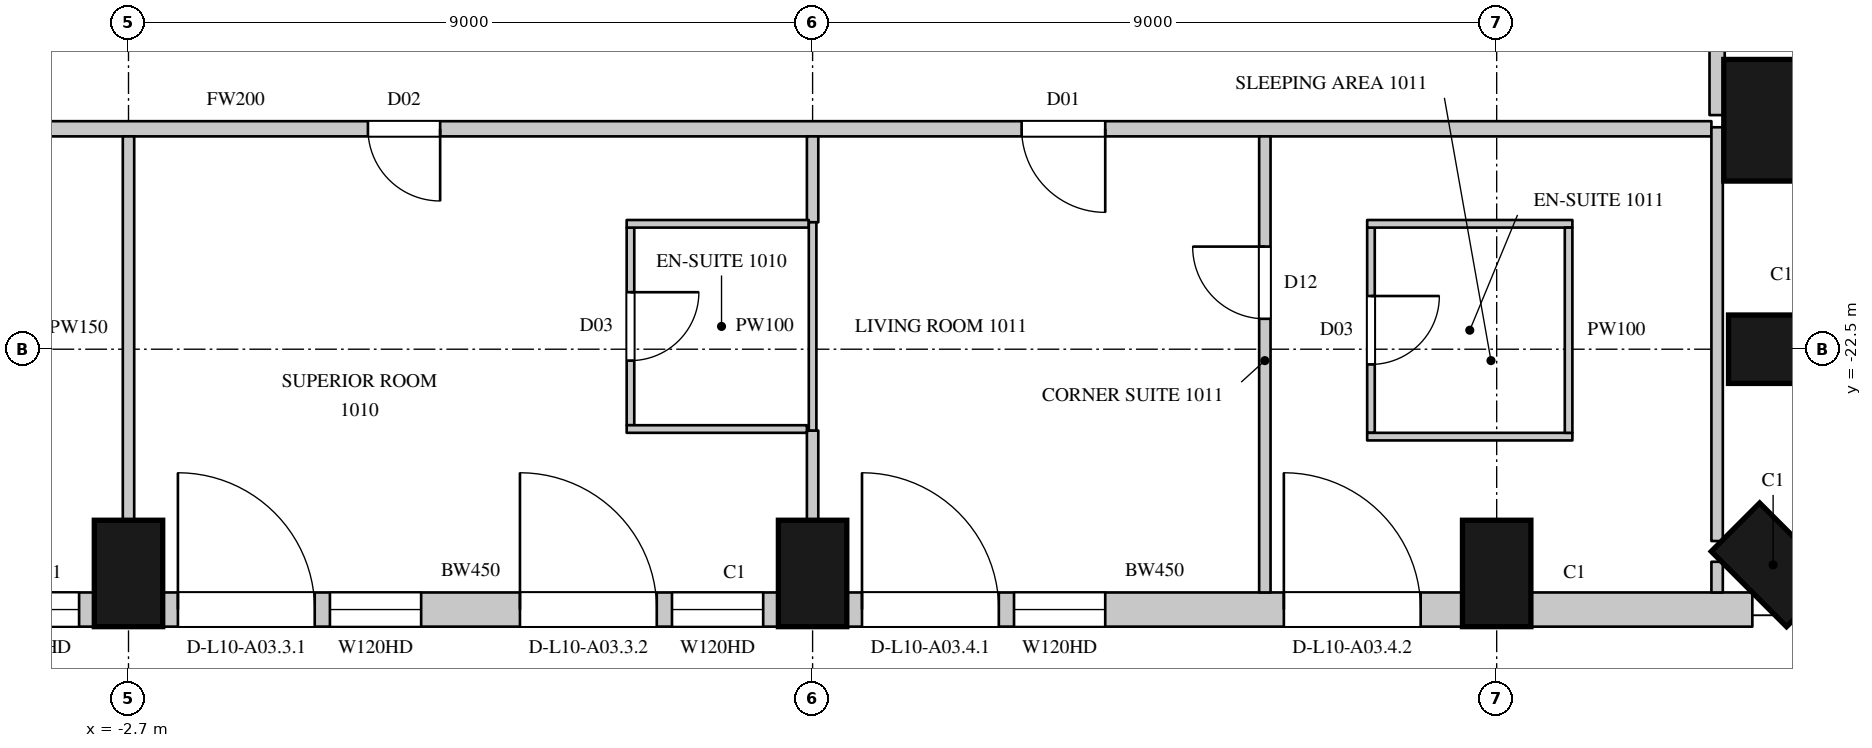
"""IFC4 building model, lengths in metres.
Left out: names, types, materials, properties, quantities, classifications, styles, units other than length and angle.
Written with IfcOpenShell. Run it as: python <this file> out.ifc"""

import sys

from ifc_helpers import new_model, si_unit, direction, frame, frame_2d, origin, origin_2d, place, context, subcontext, project, spatial, rectangle, circle, extrude, element, fill, save


model = new_model("IFC4")
c1 = context("Model", 3, precision=1e-05, world=origin(), true_north=direction((0.0, 1.0)))
c2 = subcontext(c1, "Body", "Model", "MODEL_VIEW")
j1 = project(units=[si_unit("LENGTHUNIT", "METRE"), si_unit("PLANEANGLEUNIT", "RADIAN")], contexts=[c1])
p1 = place(None, origin())
s1 = spatial("IfcSite", under=j1, at=p1, CompositionType="ELEMENT")
p2 = place(p1, origin())
s2 = spatial("IfcBuilding", under=s1, at=p2, CompositionType="ELEMENT")
p3 = place(p2, frame((0.0, 0.0, 66.3)))
s3 = spatial("IfcBuildingStorey", under=s2, at=p3, CompositionType="ELEMENT", Elevation=66.3)
for number, where, z_axis, x_axis in (
    (1, (-2.7, -25.45, 0.0), (0.0, 0.0, 1.0), (1.0, 0.0, 0.0)),
    (2, (6.3, -25.45, 0.0), (0.0, 0.0, 1.0), (1.0, 0.0, 0.0)),
    (3, (15.3, -25.45, 0.0), (0.0, 0.0, 1.0), (1.0, 0.0, 0.0)),
    (4, (18.937, -25.337, 0.0), (0.0, 0.0, 1.0), (0.707, 0.707, 0.0)),
    (5, (19.05, -22.5, 0.0), (0.0, 0.0, 1.0), (0.0, 1.0, 0.0)),
):
    element("IfcColumn", number, at=place(p3, frame(where, z_axis=z_axis, x_axis=x_axis)), inside=s3, PredefinedType="COLUMN", context=c2, shape_type="SweptSolid", body=[
        extrude(rectangle(XDim=0.9, YDim=1.4, at=origin_2d()), origin(), (0.0, 0.0, 1.0), 3.6),
    ])
p4 = place(p3, frame((19.088, -19.488, 0.0), z_axis=(0.0, 0.0, 1.0), x_axis=(1.0, 0.0, 0.0)))
e6 = element("IfcColumn", 6, at=p4, inside=s3, PredefinedType="COLUMN", context=c2, shape_type="SweptSolid", body=[
    extrude(circle(Radius=0.8, at=origin_2d()), origin(), (0.0, 0.0, 1.0), 3.6),
])
p5 = place(p3, frame((-11.25, -25.925, 0.0), z_axis=(0.0, 0.0, 1.0), x_axis=(1.0, 0.0, 0.0)))
e7 = element("IfcWall", 7, at=p5, inside=s3, PredefinedType="SOLIDWALL", context=c2, shape_type="SweptSolid", body=[
    extrude(rectangle(XDim=8.1, YDim=0.45, at=frame_2d((4.05, 0.0))), origin(), (0.0, 0.0, 1.0), 3.3),
])
p6 = place(p5, frame((0.2, 0.0, 0.0)))
e8 = element("IfcOpeningElement", 8, at=p6, cuts=e7, PredefinedType="OPENING", context=c2, shape_type="SweptSolid", body=[
    extrude(rectangle(XDim=1.8, YDim=2.4, at=frame_2d((0.9, 1.2))), frame((0.0, 0.235, 0.0), z_axis=(0.0, -1.0, 0.0), x_axis=(1.0, 0.0, 0.0)), (0.0, 0.0, 1.0), 0.47),
])
p7 = place(p5, frame((2.2, 0.0, 1.05)))
e9 = element("IfcOpeningElement", 9, at=p7, cuts=e7, PredefinedType="OPENING", context=c2, shape_type="SweptSolid", body=[
    extrude(rectangle(XDim=1.2, YDim=2.0, at=frame_2d((0.6, 1.0))), frame((0.0, 0.235, 0.0), z_axis=(0.0, -1.0, 0.0), x_axis=(1.0, 0.0, 0.0)), (0.0, 0.0, 1.0), 0.47),
])
p8 = place(p5, frame((4.7, 0.0, 0.0)))
e10 = element("IfcOpeningElement", 10, at=p8, cuts=e7, PredefinedType="OPENING", context=c2, shape_type="SweptSolid", body=[
    extrude(rectangle(XDim=1.8, YDim=2.4, at=frame_2d((0.9, 1.2))), frame((0.0, 0.235, 0.0), z_axis=(0.0, -1.0, 0.0), x_axis=(1.0, 0.0, 0.0)), (0.0, 0.0, 1.0), 0.47),
])
p9 = place(p5, frame((6.7, 0.0, 1.05)))
e11 = element("IfcOpeningElement", 11, at=p9, cuts=e7, PredefinedType="OPENING", context=c2, shape_type="SweptSolid", body=[
    extrude(rectangle(XDim=1.2, YDim=2.0, at=frame_2d((0.6, 1.0))), frame((0.0, 0.235, 0.0), z_axis=(0.0, -1.0, 0.0), x_axis=(1.0, 0.0, 0.0)), (0.0, 0.0, 1.0), 0.47),
])
p10 = place(p3, frame((-2.25, -25.925, 0.0), z_axis=(0.0, 0.0, 1.0), x_axis=(1.0, 0.0, 0.0)))
e12 = element("IfcWall", 12, at=p10, inside=s3, PredefinedType="SOLIDWALL", context=c2, shape_type="SweptSolid", body=[
    extrude(rectangle(XDim=8.1, YDim=0.45, at=frame_2d((4.05, 0.0))), origin(), (0.0, 0.0, 1.0), 3.3),
])
p11 = place(p10, frame((0.2, 0.0, 0.0)))
e13 = element("IfcOpeningElement", 13, at=p11, cuts=e12, PredefinedType="OPENING", context=c2, shape_type="SweptSolid", body=[
    extrude(rectangle(XDim=1.8, YDim=2.4, at=frame_2d((0.9, 1.2))), frame((0.0, 0.235, 0.0), z_axis=(0.0, -1.0, 0.0), x_axis=(1.0, 0.0, 0.0)), (0.0, 0.0, 1.0), 0.47),
])
p12 = place(p10, frame((2.2, 0.0, 1.05)))
e14 = element("IfcOpeningElement", 14, at=p12, cuts=e12, PredefinedType="OPENING", context=c2, shape_type="SweptSolid", body=[
    extrude(rectangle(XDim=1.2, YDim=2.0, at=frame_2d((0.6, 1.0))), frame((0.0, 0.235, 0.0), z_axis=(0.0, -1.0, 0.0), x_axis=(1.0, 0.0, 0.0)), (0.0, 0.0, 1.0), 0.47),
])
p13 = place(p10, frame((4.7, 0.0, 0.0)))
e15 = element("IfcOpeningElement", 15, at=p13, cuts=e12, PredefinedType="OPENING", context=c2, shape_type="SweptSolid", body=[
    extrude(rectangle(XDim=1.8, YDim=2.4, at=frame_2d((0.9, 1.2))), frame((0.0, 0.235, 0.0), z_axis=(0.0, -1.0, 0.0), x_axis=(1.0, 0.0, 0.0)), (0.0, 0.0, 1.0), 0.47),
])
p14 = place(p10, frame((6.7, 0.0, 1.05)))
e16 = element("IfcOpeningElement", 16, at=p14, cuts=e12, PredefinedType="OPENING", context=c2, shape_type="SweptSolid", body=[
    extrude(rectangle(XDim=1.2, YDim=2.0, at=frame_2d((0.6, 1.0))), frame((0.0, 0.235, 0.0), z_axis=(0.0, -1.0, 0.0), x_axis=(1.0, 0.0, 0.0)), (0.0, 0.0, 1.0), 0.47),
])
p15 = place(p3, frame((6.75, -25.925, 0.0), z_axis=(0.0, 0.0, 1.0), x_axis=(1.0, 0.0, 0.0)))
e17 = element("IfcWall", 17, at=p15, inside=s3, PredefinedType="SOLIDWALL", context=c2, shape_type="SweptSolid", body=[
    extrude(rectangle(XDim=8.1, YDim=0.45, at=frame_2d((4.05, 0.0))), origin(), (0.0, 0.0, 1.0), 3.3),
])
p16 = place(p15, frame((0.2, 0.0, 0.0)))
e18 = element("IfcOpeningElement", 18, at=p16, cuts=e17, PredefinedType="OPENING", context=c2, shape_type="SweptSolid", body=[
    extrude(rectangle(XDim=1.8, YDim=2.4, at=frame_2d((0.9, 1.2))), frame((0.0, 0.235, 0.0), z_axis=(0.0, -1.0, 0.0), x_axis=(1.0, 0.0, 0.0)), (0.0, 0.0, 1.0), 0.47),
])
p17 = place(p15, frame((2.2, 0.0, 1.05)))
e19 = element("IfcOpeningElement", 19, at=p17, cuts=e17, PredefinedType="OPENING", context=c2, shape_type="SweptSolid", body=[
    extrude(rectangle(XDim=1.2, YDim=2.0, at=frame_2d((0.6, 1.0))), frame((0.0, 0.235, 0.0), z_axis=(0.0, -1.0, 0.0), x_axis=(1.0, 0.0, 0.0)), (0.0, 0.0, 1.0), 0.47),
])
p18 = place(p15, frame((5.75, 0.0, 0.0)))
e20 = element("IfcOpeningElement", 20, at=p18, cuts=e17, PredefinedType="OPENING", context=c2, shape_type="SweptSolid", body=[
    extrude(rectangle(XDim=1.8, YDim=2.4, at=frame_2d((0.9, 1.2))), frame((0.0, 0.235, 0.0), z_axis=(0.0, -1.0, 0.0), x_axis=(1.0, 0.0, 0.0)), (0.0, 0.0, 1.0), 0.47),
])
p19 = place(p3, frame((15.75, -25.925, 0.0), z_axis=(0.0, 0.0, 1.0), x_axis=(1.0, 0.0, 0.0)))
e21 = element("IfcWall", 21, at=p19, inside=s3, PredefinedType="SOLIDWALL", context=c2, shape_type="SweptSolid", body=[
    extrude(rectangle(XDim=2.914, YDim=0.45, at=frame_2d((1.457, 0.0))), origin(), (0.0, 0.0, 1.0), 3.3),
])
p20 = place(p3, frame((-20.7, -19.6, 0.0), z_axis=(0.0, 0.0, 1.0), x_axis=(1.0, 0.0, 0.0)))
e22 = element("IfcWall", 22, at=p20, inside=s3, PredefinedType="PARTITIONING", context=c2, shape_type="SweptSolid", body=[
    extrude(rectangle(XDim=38.825, YDim=0.2, at=frame_2d((19.413, 0.0))), origin(), (0.0, 0.0, 1.0), 3.3),
])
p21 = place(p20, frame((3.15, 0.0, 0.0)))
e23 = element("IfcOpeningElement", 23, at=p21, cuts=e22, PredefinedType="OPENING", context=c2, shape_type="SweptSolid", body=[
    extrude(rectangle(XDim=0.95, YDim=2.2, at=frame_2d((0.475, 1.1))), frame((0.0, 0.11, 0.0), z_axis=(0.0, -1.0, 0.0), x_axis=(1.0, 0.0, 0.0)), (0.0, 0.0, 1.0), 0.22),
])
p22 = place(p20, frame((13.9, 0.0, 0.0)))
e24 = element("IfcOpeningElement", 24, at=p22, cuts=e22, PredefinedType="OPENING", context=c2, shape_type="SweptSolid", body=[
    extrude(rectangle(XDim=0.95, YDim=2.2, at=frame_2d((0.475, 1.1))), frame((0.0, 0.11, 0.0), z_axis=(0.0, -1.0, 0.0), x_axis=(1.0, 0.0, 0.0)), (0.0, 0.0, 1.0), 0.22),
])
p23 = place(p20, frame((21.15, 0.0, 0.0)))
e25 = element("IfcOpeningElement", 25, at=p23, cuts=e22, PredefinedType="OPENING", context=c2, shape_type="SweptSolid", body=[
    extrude(rectangle(XDim=0.95, YDim=2.2, at=frame_2d((0.475, 1.1))), frame((0.0, 0.11, 0.0), z_axis=(0.0, -1.0, 0.0), x_axis=(1.0, 0.0, 0.0)), (0.0, 0.0, 1.0), 0.22),
])
p24 = place(p20, frame((29.75, 0.0, 0.0)))
e26 = element("IfcOpeningElement", 26, at=p24, cuts=e22, PredefinedType="OPENING", context=c2, shape_type="SweptSolid", body=[
    extrude(rectangle(XDim=1.1, YDim=2.4, at=frame_2d((0.55, 1.2))), frame((0.0, 0.11, 0.0), z_axis=(0.0, -1.0, 0.0), x_axis=(1.0, 0.0, 0.0)), (0.0, 0.0, 1.0), 0.22),
])
p25 = place(p3, frame((18.2, -19.42, 0.0), z_axis=(0.0, 0.0, 1.0), x_axis=(0.0, 1.0, 0.0)))
e27 = element("IfcWall", 27, at=p25, inside=s3, PredefinedType="PARTITIONING", context=c2, shape_type="SweptSolid", body=[
    extrude(rectangle(XDim=14.67, YDim=0.2, at=frame_2d((7.335, 0.0))), origin(), (0.0, 0.0, 1.0), 3.3),
])
p26 = place(p25, frame((3.95, 0.0, 0.0)))
e28 = element("IfcOpeningElement", 28, at=p26, cuts=e27, PredefinedType="OPENING", context=c2, shape_type="SweptSolid", body=[
    extrude(rectangle(XDim=0.95, YDim=2.2, at=frame_2d((0.475, 1.1))), frame((0.0, 0.11, 0.0), z_axis=(0.0, -1.0, 0.0), x_axis=(1.0, 0.0, 0.0)), (0.0, 0.0, 1.0), 0.22),
])
p27 = place(p25, frame((13.35, 0.0, 0.0)))
e29 = element("IfcOpeningElement", 29, at=p27, cuts=e27, PredefinedType="OPENING", context=c2, shape_type="SweptSolid", body=[
    extrude(rectangle(XDim=0.95, YDim=2.2, at=frame_2d((0.475, 1.1))), frame((0.0, 0.11, 0.0), z_axis=(0.0, -1.0, 0.0), x_axis=(1.0, 0.0, 0.0)), (0.0, 0.0, 1.0), 0.22),
])
p28 = place(p3, frame((-2.7, -24.75, 0.0), z_axis=(0.0, 0.0, 1.0), x_axis=(0.0, 1.0, 0.0)))
e30 = element("IfcWall", 30, at=p28, inside=s3, PredefinedType="PARTITIONING", context=c2, shape_type="SweptSolid", body=[
    extrude(rectangle(XDim=5.05, YDim=0.15, at=frame_2d((2.525, 0.0))), origin(), (0.0, 0.0, 1.0), 2.75),
])
p29 = place(p3, frame((6.3, -24.75, 0.0), z_axis=(0.0, 0.0, 1.0), x_axis=(0.0, 1.0, 0.0)))
e31 = element("IfcWall", 31, at=p29, inside=s3, PredefinedType="PARTITIONING", context=c2, shape_type="SweptSolid", body=[
    extrude(rectangle(XDim=1.18, YDim=0.15, at=frame_2d((0.59, 0.0))), origin(), (0.0, 0.0, 1.0), 2.75),
])
p30 = place(p3, frame((6.3, -20.83, 0.0), z_axis=(0.0, 0.0, 1.0), x_axis=(0.0, 1.0, 0.0)))
e32 = element("IfcWall", 32, at=p30, inside=s3, PredefinedType="PARTITIONING", context=c2, shape_type="SweptSolid", body=[
    extrude(rectangle(XDim=1.13, YDim=0.15, at=frame_2d((0.565, 0.0))), origin(), (0.0, 0.0, 1.0), 2.75),
])
p31 = place(p3, frame((12.25, -25.7, 0.0), z_axis=(0.0, 0.0, 1.0), x_axis=(0.0, 1.0, 0.0)))
e33 = element("IfcWall", 33, at=p31, inside=s3, PredefinedType="PARTITIONING", context=c2, shape_type="SweptSolid", body=[
    extrude(rectangle(XDim=6.0, YDim=0.15, at=frame_2d((3.0, 0.0))), origin(), (0.0, 0.0, 1.0), 3.3),
])
p32 = place(p31, frame((3.6, 0.0, 0.0)))
e34 = element("IfcOpeningElement", 34, at=p32, cuts=e33, PredefinedType="OPENING", context=c2, shape_type="SweptSolid", body=[
    extrude(rectangle(XDim=0.95, YDim=2.2, at=frame_2d((0.475, 1.1))), frame((0.0, 0.085, 0.0), z_axis=(0.0, -1.0, 0.0), x_axis=(1.0, 0.0, 0.0)), (0.0, 0.0, 1.0), 0.17),
])
p33 = place(p3, frame((18.2, -25.7, 0.0), z_axis=(0.0, 0.0, 1.0), x_axis=(0.0, 1.0, 0.0)))
e35 = element("IfcWall", 35, at=p33, inside=s3, PredefinedType="PARTITIONING", context=c2, shape_type="SweptSolid", body=[
    extrude(rectangle(XDim=0.404, YDim=0.15, at=frame_2d((0.202, 0.0))), origin(), (0.0, 0.0, 1.0), 3.3),
])
p34 = place(p3, frame((18.2, -25.024, 0.0), z_axis=(0.0, 0.0, 1.0), x_axis=(0.0, 1.0, 0.0)))
e36 = element("IfcWall", 36, at=p34, inside=s3, PredefinedType="PARTITIONING", context=c2, shape_type="SweptSolid", body=[
    extrude(rectangle(XDim=5.444, YDim=0.15, at=frame_2d((2.722, 0.0))), origin(), (0.0, 0.0, 1.0), 3.3),
])
p35 = place(p3, frame((3.904, -23.5, 0.0), z_axis=(0.0, 0.0, 1.0), x_axis=(0.0, 1.0, 0.0)))
e37 = element("IfcWall", 37, at=p35, inside=s3, PredefinedType="PARTITIONING", context=c2, shape_type="SweptSolid", body=[
    extrude(rectangle(XDim=2.6, YDim=0.1, at=frame_2d((1.3, 0.0))), origin(), (0.0, 0.0, 1.0), 3.3),
])
p36 = place(p35, frame((0.85, 0.0, 0.0)))
e38 = element("IfcOpeningElement", 38, at=p36, cuts=e37, PredefinedType="OPENING", context=c2, shape_type="SweptSolid", body=[
    extrude(rectangle(XDim=0.9, YDim=2.2, at=frame_2d((0.45, 1.1))), frame((0.0, 0.06, 0.0), z_axis=(0.0, -1.0, 0.0), x_axis=(1.0, 0.0, 0.0)), (0.0, 0.0, 1.0), 0.12),
])
p37 = place(p3, frame((3.854, -23.55, 0.0), z_axis=(0.0, 0.0, 1.0), x_axis=(1.0, 0.0, 0.0)))
e39 = element("IfcWall", 39, at=p37, inside=s3, PredefinedType="PARTITIONING", context=c2, shape_type="SweptSolid", body=[
    extrude(rectangle(XDim=2.371, YDim=0.1, at=frame_2d((1.186, 0.0))), origin(), (0.0, 0.0, 1.0), 3.3),
])
p38 = place(p3, frame((3.854, -20.85, 0.0), z_axis=(0.0, 0.0, 1.0), x_axis=(1.0, 0.0, 0.0)))
e40 = element("IfcWall", 40, at=p38, inside=s3, PredefinedType="PARTITIONING", context=c2, shape_type="SweptSolid", body=[
    extrude(rectangle(XDim=2.396, YDim=0.1, at=frame_2d((1.198, 0.0))), origin(), (0.0, 0.0, 1.0), 3.3),
])
p39 = place(p3, frame((6.3, -23.57, 0.0), z_axis=(0.0, 0.0, 1.0), x_axis=(0.0, 1.0, 0.0)))
e41 = element("IfcWall", 41, at=p39, inside=s3, PredefinedType="PARTITIONING", context=c2, shape_type="SweptSolid", body=[
    extrude(rectangle(XDim=2.74, YDim=0.1, at=frame_2d((1.37, 0.0))), origin(), (0.0, 0.0, 1.0), 2.75),
])
p40 = place(p3, frame((13.646, -23.6, 0.0), z_axis=(0.0, 0.0, 1.0), x_axis=(0.0, 1.0, 0.0)))
e42 = element("IfcWall", 42, at=p40, inside=s3, PredefinedType="PARTITIONING", context=c2, shape_type="SweptSolid", body=[
    extrude(rectangle(XDim=2.7, YDim=0.1, at=frame_2d((1.35, 0.0))), origin(), (0.0, 0.0, 1.0), 3.3),
])
p41 = place(p40, frame((0.9, 0.0, 0.0)))
e43 = element("IfcOpeningElement", 43, at=p41, cuts=e42, PredefinedType="OPENING", context=c2, shape_type="SweptSolid", body=[
    extrude(rectangle(XDim=0.9, YDim=2.2, at=frame_2d((0.45, 1.1))), frame((0.0, 0.06, 0.0), z_axis=(0.0, -1.0, 0.0), x_axis=(1.0, 0.0, 0.0)), (0.0, 0.0, 1.0), 0.12),
])
for number, where, z_axis, x_axis in (
    (44, (13.596, -23.65, 0.0), (0.0, 0.0, 1.0), (1.0, 0.0, 0.0)),
    (45, (13.596, -20.85, 0.0), (0.0, 0.0, 1.0), (1.0, 0.0, 0.0)),
):
    element("IfcWall", number, at=place(p3, frame(where, z_axis=z_axis, x_axis=x_axis)), inside=s3, PredefinedType="PARTITIONING", context=c2, shape_type="SweptSolid", body=[
        extrude(rectangle(XDim=2.7, YDim=0.1, at=frame_2d((1.35, 0.0))), origin(), (0.0, 0.0, 1.0), 3.3),
    ])
p42 = place(p3, frame((16.246, -23.6, 0.0), z_axis=(0.0, 0.0, 1.0), x_axis=(0.0, 1.0, 0.0)))
e46 = element("IfcWall", 46, at=p42, inside=s3, PredefinedType="PARTITIONING", context=c2, shape_type="SweptSolid", body=[
    extrude(rectangle(XDim=2.7, YDim=0.1, at=frame_2d((1.35, 0.0))), origin(), (0.0, 0.0, 1.0), 3.3),
])
p43 = place(p9, origin())
e47 = element("IfcWindow", 47, at=p43, inside=s3, PartitioningType="SINGLE_PANEL", PredefinedType="WINDOW", context=c2, shape_type="SweptSolid", body=[
    extrude(rectangle(XDim=1.2, YDim=2.0, at=frame_2d((0.6, 1.0))), frame((0.0, 0.135, 0.0), z_axis=(0.0, -1.0, 0.0), x_axis=(1.0, 0.0, 0.0)), (0.0, 0.0, 1.0), 0.06),
])
fill(e11, e47)
p44 = place(p11, origin())
e48 = element("IfcDoor", 48, at=p44, inside=s3, OperationType="SLIDING_TO_LEFT", PredefinedType="DOOR", context=c2, shape_type="SweptSolid", body=[
    extrude(rectangle(XDim=1.8, YDim=2.4, at=frame_2d((0.9, 1.2))), frame((0.0, 0.13, 0.0), z_axis=(0.0, -1.0, 0.0), x_axis=(1.0, 0.0, 0.0)), (0.0, 0.0, 1.0), 0.05),
])
fill(e13, e48)
p45 = place(p12, origin())
e49 = element("IfcWindow", 49, at=p45, inside=s3, PartitioningType="SINGLE_PANEL", PredefinedType="WINDOW", context=c2, shape_type="SweptSolid", body=[
    extrude(rectangle(XDim=1.2, YDim=2.0, at=frame_2d((0.6, 1.0))), frame((0.0, 0.135, 0.0), z_axis=(0.0, -1.0, 0.0), x_axis=(1.0, 0.0, 0.0)), (0.0, 0.0, 1.0), 0.06),
])
fill(e14, e49)
p46 = place(p13, origin())
e50 = element("IfcDoor", 50, at=p46, inside=s3, OperationType="SLIDING_TO_LEFT", PredefinedType="DOOR", context=c2, shape_type="SweptSolid", body=[
    extrude(rectangle(XDim=1.8, YDim=2.4, at=frame_2d((0.9, 1.2))), frame((0.0, 0.13, 0.0), z_axis=(0.0, -1.0, 0.0), x_axis=(1.0, 0.0, 0.0)), (0.0, 0.0, 1.0), 0.05),
])
fill(e15, e50)
p47 = place(p14, origin())
e51 = element("IfcWindow", 51, at=p47, inside=s3, PartitioningType="SINGLE_PANEL", PredefinedType="WINDOW", context=c2, shape_type="SweptSolid", body=[
    extrude(rectangle(XDim=1.2, YDim=2.0, at=frame_2d((0.6, 1.0))), frame((0.0, 0.135, 0.0), z_axis=(0.0, -1.0, 0.0), x_axis=(1.0, 0.0, 0.0)), (0.0, 0.0, 1.0), 0.06),
])
fill(e16, e51)
p48 = place(p16, origin())
e52 = element("IfcDoor", 52, at=p48, inside=s3, OperationType="SLIDING_TO_LEFT", PredefinedType="DOOR", context=c2, shape_type="SweptSolid", body=[
    extrude(rectangle(XDim=1.8, YDim=2.4, at=frame_2d((0.9, 1.2))), frame((0.0, 0.13, 0.0), z_axis=(0.0, -1.0, 0.0), x_axis=(1.0, 0.0, 0.0)), (0.0, 0.0, 1.0), 0.05),
])
fill(e18, e52)
p49 = place(p17, origin())
e53 = element("IfcWindow", 53, at=p49, inside=s3, PartitioningType="SINGLE_PANEL", PredefinedType="WINDOW", context=c2, shape_type="SweptSolid", body=[
    extrude(rectangle(XDim=1.2, YDim=2.0, at=frame_2d((0.6, 1.0))), frame((0.0, 0.135, 0.0), z_axis=(0.0, -1.0, 0.0), x_axis=(1.0, 0.0, 0.0)), (0.0, 0.0, 1.0), 0.06),
])
fill(e19, e53)
p50 = place(p18, origin())
e54 = element("IfcDoor", 54, at=p50, inside=s3, OperationType="SLIDING_TO_LEFT", PredefinedType="DOOR", context=c2, shape_type="SweptSolid", body=[
    extrude(rectangle(XDim=1.8, YDim=2.4, at=frame_2d((0.9, 1.2))), frame((0.0, 0.13, 0.0), z_axis=(0.0, -1.0, 0.0), x_axis=(1.0, 0.0, 0.0)), (0.0, 0.0, 1.0), 0.05),
])
fill(e20, e54)
p51 = place(p23, origin())
e55 = element("IfcDoor", 55, at=p51, inside=s3, OperationType="SINGLE_SWING_LEFT", PredefinedType="DOOR", context=c2, shape_type="SweptSolid", body=[
    extrude(rectangle(XDim=0.95, YDim=2.2, at=frame_2d((0.475, 1.1))), frame((0.0, 0.025, 0.0), z_axis=(0.0, -1.0, 0.0), x_axis=(1.0, 0.0, 0.0)), (0.0, 0.0, 1.0), 0.05),
])
fill(e25, e55)
p52 = place(p36, origin())
e56 = element("IfcDoor", 56, at=p52, inside=s3, OperationType="SINGLE_SWING_LEFT", PredefinedType="DOOR", context=c2, shape_type="SweptSolid", body=[
    extrude(rectangle(XDim=0.9, YDim=2.2, at=frame_2d((0.45, 1.1))), frame((0.0, 0.025, 0.0), z_axis=(0.0, -1.0, 0.0), x_axis=(1.0, 0.0, 0.0)), (0.0, 0.0, 1.0), 0.05),
])
fill(e38, e56)
p53 = place(p24, origin())
e57 = element("IfcDoor", 57, at=p53, inside=s3, OperationType="SINGLE_SWING_LEFT", PredefinedType="DOOR", context=c2, shape_type="SweptSolid", body=[
    extrude(rectangle(XDim=1.1, YDim=2.4, at=frame_2d((0.55, 1.2))), frame((0.0, 0.025, 0.0), z_axis=(0.0, -1.0, 0.0), x_axis=(1.0, 0.0, 0.0)), (0.0, 0.0, 1.0), 0.05),
])
fill(e26, e57)
p54 = place(p32, origin())
e58 = element("IfcDoor", 58, at=p54, inside=s3, OperationType="SINGLE_SWING_RIGHT", PredefinedType="DOOR", context=c2, shape_type="SweptSolid", body=[
    extrude(rectangle(XDim=0.95, YDim=2.2, at=frame_2d((0.475, 1.1))), frame((0.0, 0.025, 0.0), z_axis=(0.0, -1.0, 0.0), x_axis=(1.0, 0.0, 0.0)), (0.0, 0.0, 1.0), 0.05),
])
fill(e34, e58)
p55 = place(p41, origin())
e59 = element("IfcDoor", 59, at=p55, inside=s3, OperationType="SINGLE_SWING_LEFT", PredefinedType="DOOR", context=c2, shape_type="SweptSolid", body=[
    extrude(rectangle(XDim=0.9, YDim=2.2, at=frame_2d((0.45, 1.1))), frame((0.0, 0.025, 0.0), z_axis=(0.0, -1.0, 0.0), x_axis=(1.0, 0.0, 0.0)), (0.0, 0.0, 1.0), 0.05),
])
fill(e43, e59)
save(model, sys.argv[1])
